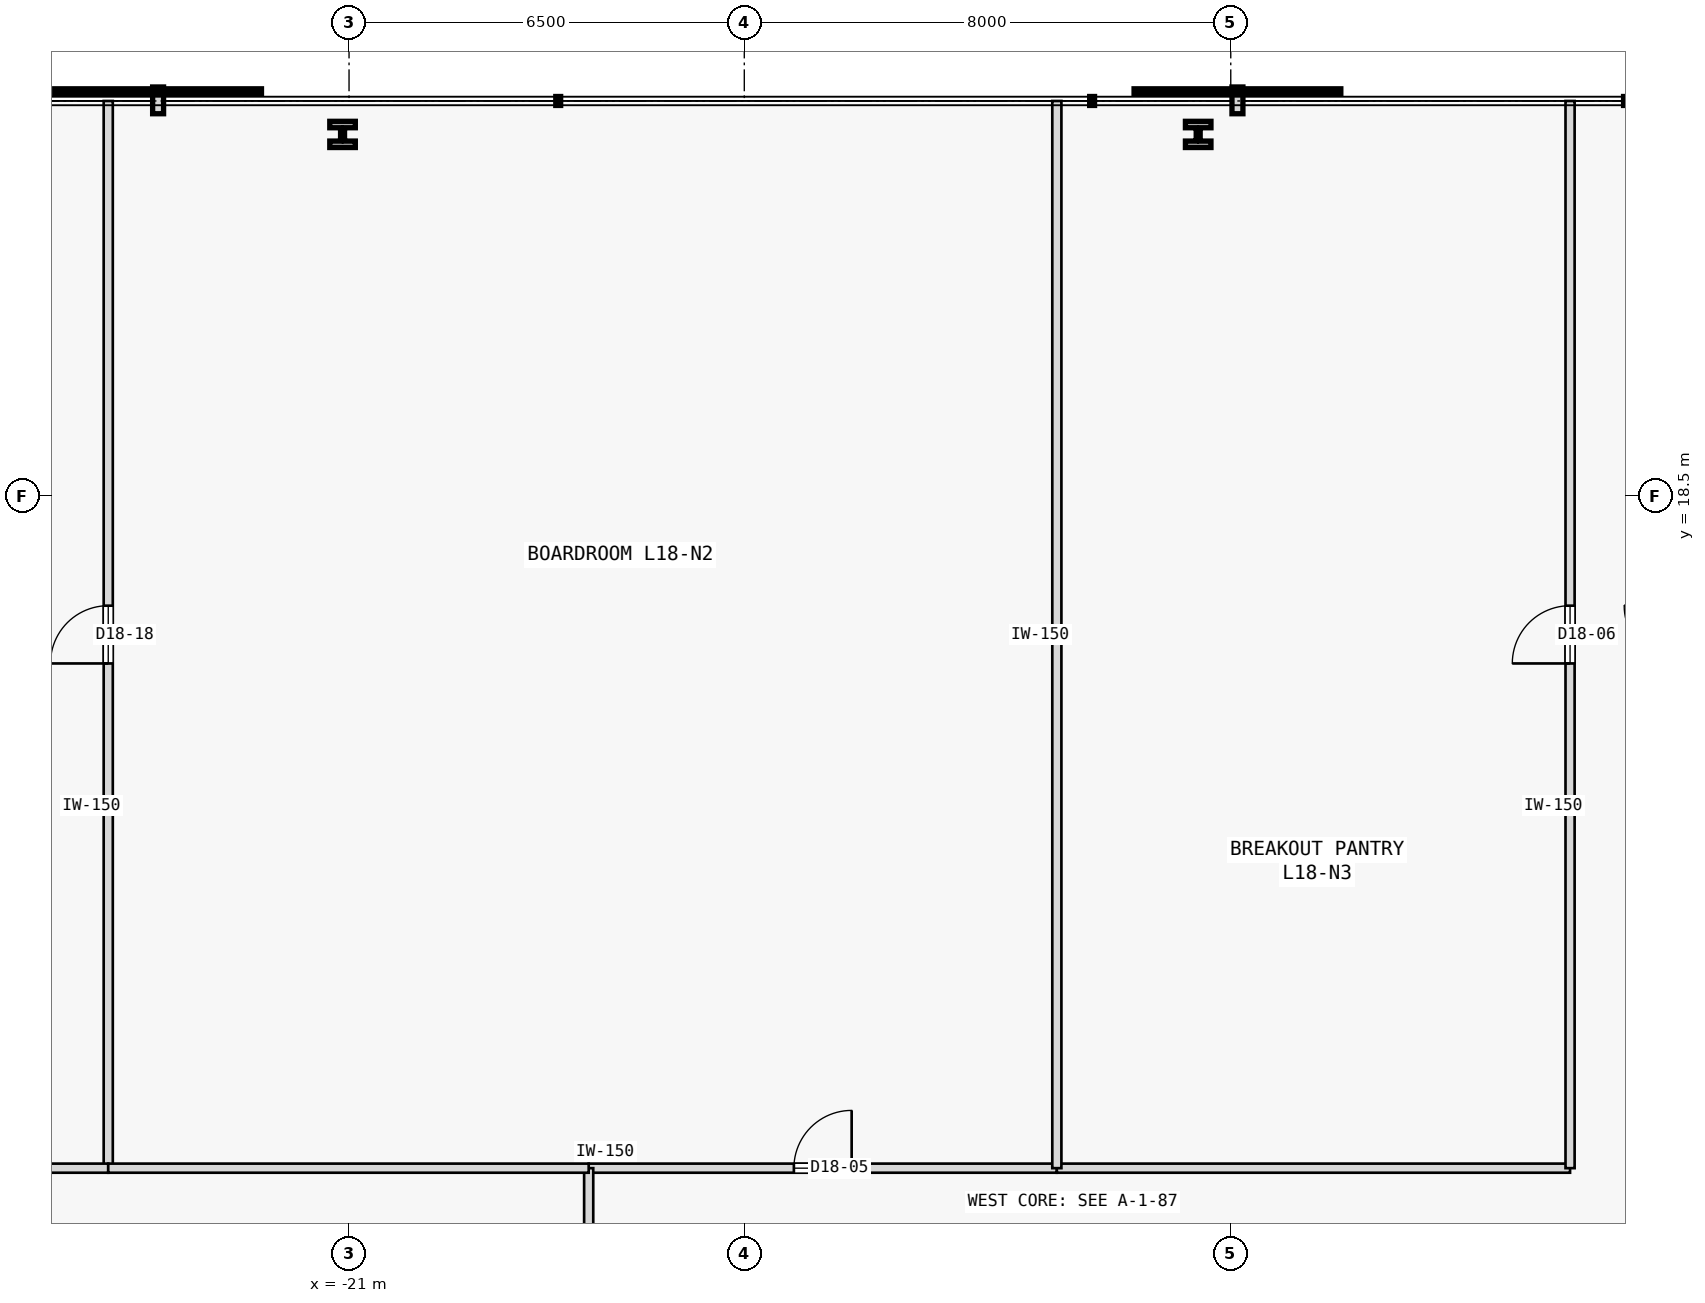
"""IFC4 building model, lengths in metres.
Left out: names, types, materials, properties, quantities, classifications, styles, units other than length and angle.
Written with IfcOpenShell. Run it as: python <this file> out.ifc"""

import sys

from ifc_helpers import new_model, si_unit, direction, frame, frame_2d, origin, origin_2d, place, context, subcontext, project, spatial, rectangle, i_section, extrude, element, fill, save


model = new_model("IFC4")
c1 = context("Model", 3, precision=1e-05, world=origin(), true_north=direction((0.0, 1.0)))
c2 = subcontext(c1, "Body", "Model", "MODEL_VIEW")
j1 = project(units=[si_unit("LENGTHUNIT", "METRE"), si_unit("PLANEANGLEUNIT", "RADIAN")], contexts=[c1])
p1 = place(None, origin())
s1 = spatial("IfcSite", under=j1, at=p1, CompositionType="ELEMENT")
p2 = place(p1, origin())
s2 = spatial("IfcBuilding", under=s1, at=p2, CompositionType="ELEMENT")
p3 = place(p2, frame((0.0, 0.0, 75.0)))
s3 = spatial("IfcBuildingStorey", under=s2, at=p3, CompositionType="ELEMENT", Elevation=75.0)
for number, where, z_axis, x_axis in (
    (1, (-7.036, 24.45, 0.0), (0.0, 0.0, 1.0), (1.0, 0.0, 0.0)),
    (2, (-21.107, 24.45, 0.0), (0.0, 0.0, 1.0), (1.0, 0.0, 0.0)),
):
    element("IfcColumn", number, at=place(p3, frame(where, z_axis=z_axis, x_axis=x_axis)), inside=s3, PredefinedType="COLUMN", context=c2, shape_type="SweptSolid", body=[
        extrude(i_section(OverallWidth=0.42, OverallDepth=0.431, WebThickness=0.065, FlangeThickness=0.106, FilletRadius=0.015, at=origin_2d()), origin(), (0.0, 0.0, 1.0), 3.8),
    ])
p4 = place(p3, frame((-17.059, 7.45, 0.0), z_axis=(0.0, 0.0, 1.0), x_axis=(1.0, 0.0, 0.0)))
e3 = element("IfcWall", 3, at=p4, inside=s3, PredefinedType="PARTITIONING", context=c2, shape_type="SweptSolid", body=[
    extrude(rectangle(XDim=7.699, YDim=0.15, at=frame_2d((3.85, 0.0))), origin(), (0.0, 0.0, 1.0), 3.4),
])
p5 = place(p4, frame((3.375, 0.0, 0.0)))
e4 = element("IfcOpeningElement", 4, at=p5, cuts=e3, PredefinedType="OPENING", context=c2, shape_type="SweptSolid", body=[
    extrude(rectangle(XDim=0.95, YDim=2.15, at=frame_2d((0.475, 1.075))), frame((0.0, 0.085, 0.0), z_axis=(0.0, -1.0, 0.0), x_axis=(1.0, 0.0, 0.0)), (0.0, 0.0, 1.0), 0.17),
])
p6 = place(p3, frame((-9.36, 7.45, 0.0), z_axis=(0.0, 0.0, 1.0), x_axis=(1.0, 0.0, 0.0)))
e5 = element("IfcWall", 5, at=p6, inside=s3, PredefinedType="PARTITIONING", context=c2, shape_type="SweptSolid", body=[
    extrude(rectangle(XDim=8.44, YDim=0.15, at=frame_2d((4.22, 0.0))), origin(), (0.0, 0.0, 1.0), 3.4),
])
p7 = place(p3, frame((-0.92, 7.45, 0.0), z_axis=(0.0, 0.0, 1.0), x_axis=(0.0, 1.0, 0.0)))
e6 = element("IfcWall", 6, at=p7, inside=s3, PredefinedType="PARTITIONING", context=c2, shape_type="SweptSolid", body=[
    extrude(rectangle(XDim=17.55, YDim=0.15, at=frame_2d((8.775, 0.0))), origin(), (0.0, 0.0, 1.0), 3.4),
])
p8 = place(p7, frame((8.3, 0.0, 0.0)))
e7 = element("IfcOpeningElement", 7, at=p8, cuts=e6, PredefinedType="OPENING", context=c2, shape_type="SweptSolid", body=[
    extrude(rectangle(XDim=0.95, YDim=2.15, at=frame_2d((0.475, 1.075))), frame((0.0, 0.085, 0.0), z_axis=(0.0, -1.0, 0.0), x_axis=(1.0, 0.0, 0.0)), (0.0, 0.0, 1.0), 0.17),
])
p9 = place(p3, frame((-17.059, 0.92, 0.0), z_axis=(0.0, 0.0, 1.0), x_axis=(0.0, 1.0, 0.0)))
e8 = element("IfcWall", 8, at=p9, inside=s3, PredefinedType="PARTITIONING", context=c2, shape_type="SweptSolid", body=[
    extrude(rectangle(XDim=6.53, YDim=0.15, at=frame_2d((3.265, 0.0))), origin(), (0.0, 0.0, 1.0), 3.4),
])
p10 = place(p3, frame((-24.96, 7.45, 0.0), z_axis=(0.0, 0.0, 1.0), x_axis=(0.0, 1.0, 0.0)))
e9 = element("IfcWall", 9, at=p10, inside=s3, PredefinedType="PARTITIONING", context=c2, shape_type="SweptSolid", body=[
    extrude(rectangle(XDim=17.55, YDim=0.15, at=frame_2d((8.775, 0.0))), origin(), (0.0, 0.0, 1.0), 3.4),
])
p11 = place(p10, frame((8.3, 0.0, 0.0)))
e10 = element("IfcOpeningElement", 10, at=p11, cuts=e9, PredefinedType="OPENING", context=c2, shape_type="SweptSolid", body=[
    extrude(rectangle(XDim=0.95, YDim=2.15, at=frame_2d((0.475, 1.075))), frame((0.0, 0.085, 0.0), z_axis=(0.0, -1.0, 0.0), x_axis=(1.0, 0.0, 0.0)), (0.0, 0.0, 1.0), 0.17),
])
p12 = place(p3, frame((-39.0, 7.45, 0.0), z_axis=(0.0, 0.0, 1.0), x_axis=(1.0, 0.0, 0.0)))
e11 = element("IfcWall", 11, at=p12, inside=s3, PredefinedType="PARTITIONING", context=c2, shape_type="SweptSolid", body=[
    extrude(rectangle(XDim=14.04, YDim=0.15, at=frame_2d((7.02, 0.0))), origin(), (0.0, 0.0, 1.0), 2.95),
])
p13 = place(p3, frame((-9.36, 7.45, 0.0), z_axis=(0.0, 0.0, 1.0), x_axis=(0.0, 1.0, 0.0)))
e12 = element("IfcWall", 12, at=p13, inside=s3, PredefinedType="PARTITIONING", context=c2, shape_type="SweptSolid", body=[
    extrude(rectangle(XDim=17.55, YDim=0.15, at=frame_2d((8.775, 0.0))), origin(), (0.0, 0.0, 1.0), 3.4),
])
p14 = place(p3, frame((-24.96, 7.45, 0.0), z_axis=(0.0, 0.0, 1.0), x_axis=(1.0, 0.0, 0.0)))
e13 = element("IfcWall", 13, at=p14, inside=s3, PredefinedType="PARTITIONING", context=c2, shape_type="SweptSolid", body=[
    extrude(rectangle(XDim=7.901, YDim=0.15, at=frame_2d((3.95, 0.0))), origin(), (0.0, 0.0, 1.0), 3.4),
])
p15 = place(p5, origin())
e14 = element("IfcDoor", 14, at=p15, inside=s3, OperationType="SINGLE_SWING_RIGHT", PredefinedType="DOOR", context=c2, shape_type="SweptSolid", body=[
    extrude(rectangle(XDim=0.95, YDim=2.15, at=frame_2d((0.475, 1.075))), frame((0.0, 0.025, 0.0), z_axis=(0.0, -1.0, 0.0), x_axis=(1.0, 0.0, 0.0)), (0.0, 0.0, 1.0), 0.05),
])
fill(e4, e14)
p16 = place(p8, origin())
e15 = element("IfcDoor", 15, at=p16, inside=s3, OperationType="SINGLE_SWING_LEFT", PredefinedType="DOOR", context=c2, shape_type="SweptSolid", body=[
    extrude(rectangle(XDim=0.95, YDim=2.15, at=frame_2d((0.475, 1.075))), frame((0.0, 0.025, 0.0), z_axis=(0.0, -1.0, 0.0), x_axis=(1.0, 0.0, 0.0)), (0.0, 0.0, 1.0), 0.05),
])
fill(e7, e15)
p17 = place(p11, origin())
e16 = element("IfcDoor", 16, at=p17, inside=s3, OperationType="SINGLE_SWING_LEFT", PredefinedType="DOOR", context=c2, shape_type="SweptSolid", body=[
    extrude(rectangle(XDim=0.95, YDim=2.15, at=frame_2d((0.475, 1.075))), frame((0.0, 0.025, 0.0), z_axis=(0.0, -1.0, 0.0), x_axis=(1.0, 0.0, 0.0)), (0.0, 0.0, 1.0), 0.05),
])
fill(e10, e16)
save(model, sys.argv[1])
